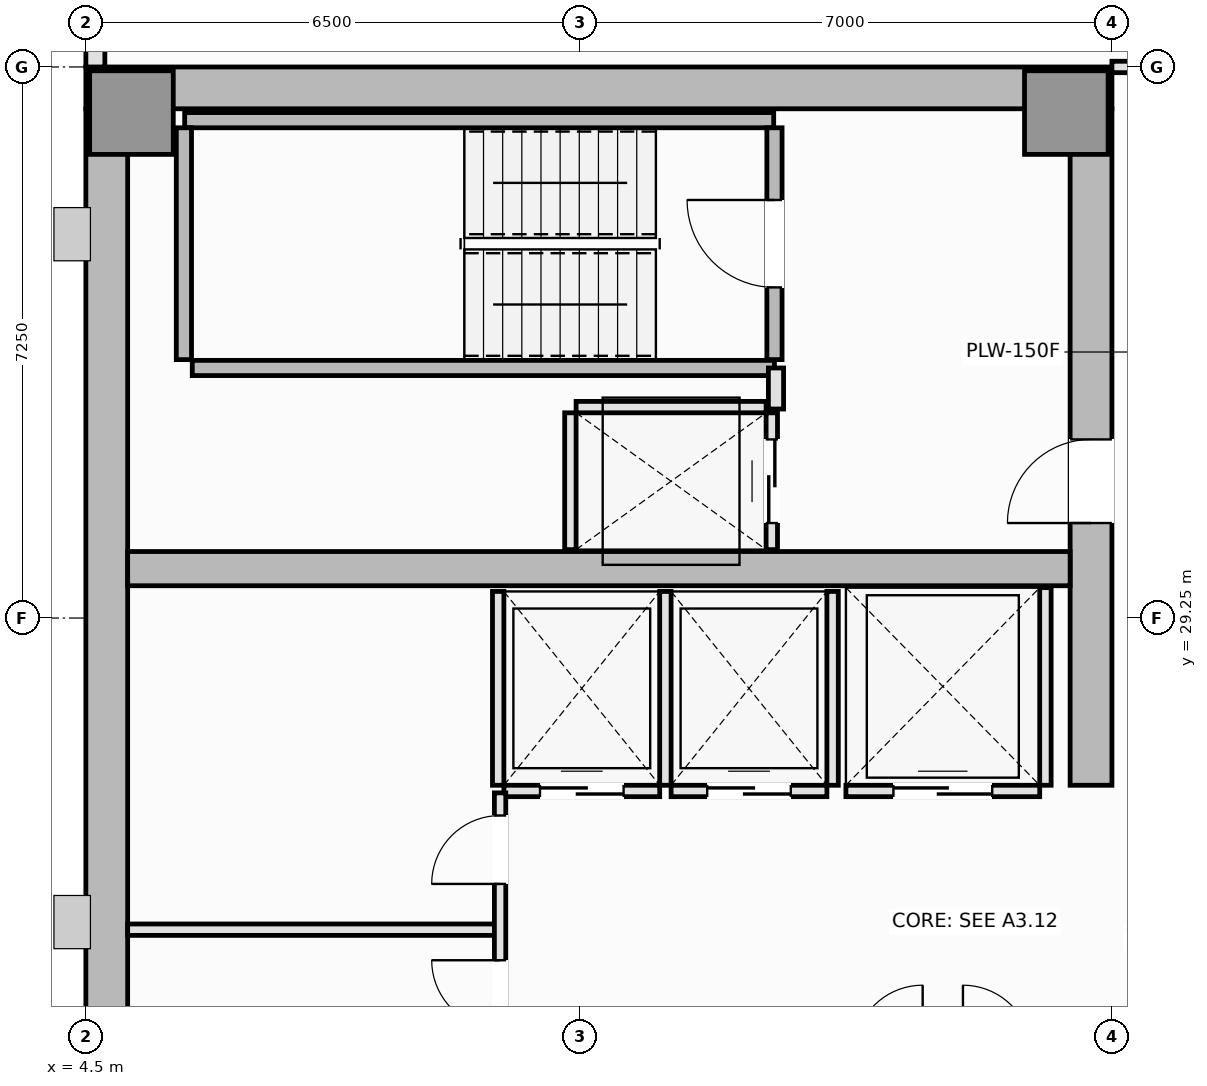
"""IFC4 building model, lengths in metres.
Left out: names, types, materials, properties, quantities, classifications, styles, units other than length and angle.
Written with IfcOpenShell. Run it as: python <this file> out.ifc"""

import sys

from ifc_helpers import new_model, si_unit, direction, frame, frame_2d, origin, origin_2d, place, context, subcontext, project, spatial, rectangle, extrude, element, fill, save


model = new_model("IFC4")
c1 = context("Model", 3, precision=1e-05, world=origin(), true_north=direction((0.0, 1.0)))
c2 = subcontext(c1, "Body", "Model", "MODEL_VIEW")
j1 = project(units=[si_unit("LENGTHUNIT", "METRE"), si_unit("PLANEANGLEUNIT", "RADIAN")], contexts=[c1])
p1 = place(None, origin())
s1 = spatial("IfcSite", under=j1, at=p1, CompositionType="ELEMENT")
p2 = place(p1, origin())
s2 = spatial("IfcBuilding", under=s1, at=p2, CompositionType="ELEMENT")
p3 = place(p2, frame((0.0, 0.0, 223.55)))
s3 = spatial("IfcBuildingStorey", under=s2, at=p3, CompositionType="ELEMENT", Elevation=223.55)
p4 = place(p3, frame((4.5, 36.225, 0.0), z_axis=(0.0, 0.0, 1.0), x_axis=(1.0, 0.0, 0.0)))
e1 = element("IfcWall", 1, at=p4, inside=s3, PredefinedType="SHEAR", context=c2, shape_type="SweptSolid", body=[
    extrude(rectangle(XDim=13.5, YDim=0.55, at=frame_2d((6.75, 0.0))), origin(), (0.0, 0.0, 1.0), 3.55),
])
p5 = place(p3, frame((4.775, 14.55, 0.0), z_axis=(0.0, 0.0, 1.0), x_axis=(0.0, 1.0, 0.0)))
e2 = element("IfcWall", 2, at=p5, inside=s3, PredefinedType="SHEAR", context=c2, shape_type="SweptSolid", body=[
    extrude(rectangle(XDim=21.4, YDim=0.55, at=frame_2d((10.7, 0.0))), origin(), (0.0, 0.0, 1.0), 3.55),
])
p6 = place(p3, frame((17.725, 27.05, 0.0), z_axis=(0.0, 0.0, 1.0), x_axis=(0.0, 1.0, 0.0)))
e3 = element("IfcWall", 3, at=p6, inside=s3, PredefinedType="SHEAR", context=c2, shape_type="SweptSolid", body=[
    extrude(rectangle(XDim=8.9, YDim=0.55, at=frame_2d((4.45, 0.0))), origin(), (0.0, 0.0, 1.0), 3.55),
])
p7 = place(p6, frame((3.45, 0.0, 0.0)))
e4 = element("IfcOpeningElement", 4, at=p7, cuts=e3, PredefinedType="OPENING", context=c2, shape_type="SweptSolid", body=[
    extrude(rectangle(XDim=1.1, YDim=2.15, at=frame_2d((0.55, 1.075))), frame((0.0, 0.285, 0.0), z_axis=(0.0, -1.0, 0.0), x_axis=(1.0, 0.0, 0.0)), (0.0, 0.0, 1.0), 0.57),
])
p8 = place(p3, frame((5.05, 29.9, 0.0), z_axis=(0.0, 0.0, 1.0), x_axis=(1.0, 0.0, 0.0)))
e5 = element("IfcWall", 5, at=p8, inside=s3, PredefinedType="SHEAR", context=c2, shape_type="SweptSolid", body=[
    extrude(rectangle(XDim=12.4, YDim=0.45, at=frame_2d((6.2, 0.0))), origin(), (0.0, 0.0, 1.0), 3.55),
])
for number, where, z_axis, x_axis in (
    (6, (5.1, 35.9, 0.0), (0.0, 0.0, 1.0), (1.0, 0.0, 0.0)),
    (7, (17.4, 35.9, 0.0), (0.0, 0.0, 1.0), (1.0, 0.0, 0.0)),
):
    element("IfcColumn", number, at=place(p3, frame(where, z_axis=z_axis, x_axis=x_axis)), inside=s3, PredefinedType="PILASTER", context=c2, shape_type="SweptSolid", body=[
        extrude(rectangle(XDim=1.1, YDim=1.1, at=origin_2d()), origin(), (0.0, 0.0, 1.0), 3.55),
    ])
p9 = place(p3, frame((4.625, 40.5, 0.0), z_axis=(0.0, 0.0, 1.0), x_axis=(0.0, -1.0, 0.0)))
e8 = element("IfcWall", 8, at=p9, inside=s3, PredefinedType="SOLIDWALL", context=c2, shape_type="SweptSolid", body=[
    extrude(rectangle(XDim=4.0, YDim=0.25, at=frame_2d((2.0, 0.0))), origin(), (0.0, 0.0, 1.0), 3.37),
])
p10 = place(p9, frame((0.9, 0.0, 0.9)))
e9 = element("IfcOpeningElement", 9, at=p10, cuts=e8, PredefinedType="OPENING", context=c2, shape_type="SweptSolid", body=[
    extrude(rectangle(XDim=2.2, YDim=1.8, at=frame_2d((1.1, 0.9))), frame((0.0, 0.135, 0.0), z_axis=(0.0, -1.0, 0.0), x_axis=(1.0, 0.0, 0.0)), (0.0, 0.0, 1.0), 0.27),
])
p11 = place(p3, frame((5.8, 35.8, 0.0), z_axis=(0.0, 0.0, 1.0), x_axis=(1.0, 0.0, 0.0)))
e10 = element("IfcWall", 10, at=p11, inside=s3, PredefinedType="SOLIDWALL", context=c2, shape_type="SweptSolid", body=[
    extrude(rectangle(XDim=7.75, YDim=0.2, at=frame_2d((3.875, 0.0))), origin(), (0.0, 0.0, 1.0), 3.55),
])
p12 = place(p3, frame((5.79, 32.65, 0.0), z_axis=(0.0, 0.0, 1.0), x_axis=(0.0, 1.0, 0.0)))
e11 = element("IfcWall", 11, at=p12, inside=s3, PredefinedType="SOLIDWALL", context=c2, shape_type="SweptSolid", body=[
    extrude(rectangle(XDim=3.05, YDim=0.2, at=frame_2d((1.525, 0.0))), origin(), (0.0, 0.0, 1.0), 3.55),
])
p13 = place(p3, frame((5.9, 32.54, 0.0), z_axis=(0.0, 0.0, 1.0), x_axis=(1.0, 0.0, 0.0)))
e12 = element("IfcWall", 12, at=p13, inside=s3, PredefinedType="SOLIDWALL", context=c2, shape_type="SweptSolid", body=[
    extrude(rectangle(XDim=7.66, YDim=0.2, at=frame_2d((3.83, 0.0))), origin(), (0.0, 0.0, 1.0), 3.55),
])
p14 = place(p3, frame((13.56, 32.65, 0.0), z_axis=(0.0, 0.0, 1.0), x_axis=(0.0, 1.0, 0.0)))
e13 = element("IfcWall", 13, at=p14, inside=s3, PredefinedType="SOLIDWALL", context=c2, shape_type="SweptSolid", body=[
    extrude(rectangle(XDim=3.05, YDim=0.2, at=frame_2d((1.525, 0.0))), origin(), (0.0, 0.0, 1.0), 3.55),
])
p15 = place(p14, frame((0.95, 0.0, 0.0)))
e14 = element("IfcOpeningElement", 14, at=p15, cuts=e13, PredefinedType="OPENING", context=c2, shape_type="SweptSolid", body=[
    extrude(rectangle(XDim=1.15, YDim=2.15, at=frame_2d((0.575, 1.075))), frame((0.0, 0.11, 0.0), z_axis=(0.0, -1.0, 0.0), x_axis=(1.0, 0.0, 0.0)), (0.0, 0.0, 1.0), 0.22),
])
p16 = place(p3, frame((10.0, 26.975, 0.0), z_axis=(0.0, 0.0, 1.0), x_axis=(1.0, 0.0, 0.0)))
e15 = element("IfcWall", 15, at=p16, inside=s3, PredefinedType="PARTITIONING", context=c2, shape_type="SweptSolid", body=[
    extrude(rectangle(XDim=2.05, YDim=0.15, at=frame_2d((1.025, 0.0))), origin(), (0.0, 0.0, 1.0), 3.37),
])
p17 = place(p16, frame((0.475, 0.0, 0.0)))
e16 = element("IfcOpeningElement", 16, at=p17, cuts=e15, PredefinedType="OPENING", context=c2, shape_type="SweptSolid", body=[
    extrude(rectangle(XDim=1.1, YDim=2.2, at=frame_2d((0.55, 1.1))), frame((0.0, 0.085, 0.0), z_axis=(0.0, -1.0, 0.0), x_axis=(1.0, 0.0, 0.0)), (0.0, 0.0, 1.0), 0.17),
])
for number, where, z_axis, x_axis in (
    (17, (9.925, 27.05, 0.0), (0.0, 0.0, 1.0), (0.0, 1.0, 0.0)),
    (18, (12.125, 27.05, 0.0), (0.0, 0.0, 1.0), (0.0, 1.0, 0.0)),
):
    element("IfcWall", number, at=place(p3, frame(where, z_axis=z_axis, x_axis=x_axis)), inside=s3, PredefinedType="PARTITIONING", context=c2, shape_type="SweptSolid", body=[
        extrude(rectangle(XDim=2.55, YDim=0.15, at=frame_2d((1.275, 0.0))), origin(), (0.0, 0.0, 1.0), 3.37),
    ])
p18 = place(p3, frame((12.2, 26.975, 0.0), z_axis=(0.0, 0.0, 1.0), x_axis=(1.0, 0.0, 0.0)))
e19 = element("IfcWall", 19, at=p18, inside=s3, PredefinedType="PARTITIONING", context=c2, shape_type="SweptSolid", body=[
    extrude(rectangle(XDim=2.05, YDim=0.15, at=frame_2d((1.025, 0.0))), origin(), (0.0, 0.0, 1.0), 3.37),
])
p19 = place(p18, frame((0.475, 0.0, 0.0)))
e20 = element("IfcOpeningElement", 20, at=p19, cuts=e19, PredefinedType="OPENING", context=c2, shape_type="SweptSolid", body=[
    extrude(rectangle(XDim=1.1, YDim=2.2, at=frame_2d((0.55, 1.1))), frame((0.0, 0.085, 0.0), z_axis=(0.0, -1.0, 0.0), x_axis=(1.0, 0.0, 0.0)), (0.0, 0.0, 1.0), 0.17),
])
p20 = place(p3, frame((14.325, 27.05, 0.0), z_axis=(0.0, 0.0, 1.0), x_axis=(0.0, 1.0, 0.0)))
e21 = element("IfcWall", 21, at=p20, inside=s3, PredefinedType="PARTITIONING", context=c2, shape_type="SweptSolid", body=[
    extrude(rectangle(XDim=2.55, YDim=0.15, at=frame_2d((1.275, 0.0))), origin(), (0.0, 0.0, 1.0), 3.37),
])
p21 = place(p3, frame((14.5, 26.975, 0.0), z_axis=(0.0, 0.0, 1.0), x_axis=(1.0, 0.0, 0.0)))
e22 = element("IfcWall", 22, at=p21, inside=s3, PredefinedType="PARTITIONING", context=c2, shape_type="SweptSolid", body=[
    extrude(rectangle(XDim=2.55, YDim=0.15, at=frame_2d((1.275, 0.0))), origin(), (0.0, 0.0, 1.0), 3.37),
])
p22 = place(p21, frame((0.625, 0.0, 0.0)))
e23 = element("IfcOpeningElement", 23, at=p22, cuts=e22, PredefinedType="OPENING", context=c2, shape_type="SweptSolid", body=[
    extrude(rectangle(XDim=1.3, YDim=2.2, at=frame_2d((0.65, 1.1))), frame((0.0, 0.085, 0.0), z_axis=(0.0, -1.0, 0.0), x_axis=(1.0, 0.0, 0.0)), (0.0, 0.0, 1.0), 0.17),
])
p23 = place(p3, frame((17.125, 27.05, 0.0), z_axis=(0.0, 0.0, 1.0), x_axis=(0.0, 1.0, 0.0)))
e24 = element("IfcWall", 24, at=p23, inside=s3, PredefinedType="PARTITIONING", context=c2, shape_type="SweptSolid", body=[
    extrude(rectangle(XDim=2.6, YDim=0.15, at=frame_2d((1.3, 0.0))), origin(), (0.0, 0.0, 1.0), 3.37),
])
p24 = place(p3, frame((10.95, 32.025, 0.0), z_axis=(0.0, 0.0, 1.0), x_axis=(1.0, 0.0, 0.0)))
e25 = element("IfcWall", 25, at=p24, inside=s3, PredefinedType="PARTITIONING", context=c2, shape_type="SweptSolid", body=[
    extrude(rectangle(XDim=2.5, YDim=0.15, at=frame_2d((1.25, 0.0))), origin(), (0.0, 0.0, 1.0), 3.37),
])
p25 = place(p3, frame((10.875, 30.15, 0.0), z_axis=(0.0, 0.0, 1.0), x_axis=(0.0, 1.0, 0.0)))
e26 = element("IfcWall", 26, at=p25, inside=s3, PredefinedType="PARTITIONING", context=c2, shape_type="SweptSolid", body=[
    extrude(rectangle(XDim=1.8, YDim=0.15, at=frame_2d((0.9, 0.0))), origin(), (0.0, 0.0, 1.0), 3.37),
])
p26 = place(p3, frame((13.525, 30.15, 0.0), z_axis=(0.0, 0.0, 1.0), x_axis=(0.0, 1.0, 0.0)))
e27 = element("IfcWall", 27, at=p26, inside=s3, PredefinedType="PARTITIONING", context=c2, shape_type="SweptSolid", body=[
    extrude(rectangle(XDim=1.8, YDim=0.15, at=frame_2d((0.9, 0.0))), origin(), (0.0, 0.0, 1.0), 3.37),
])
p27 = place(p26, frame((0.35, 0.0, 0.0)))
e28 = element("IfcOpeningElement", 28, at=p27, cuts=e27, PredefinedType="OPENING", context=c2, shape_type="SweptSolid", body=[
    extrude(rectangle(XDim=1.1, YDim=2.2, at=frame_2d((0.55, 1.1))), frame((0.0, 0.085, 0.0), z_axis=(0.0, -1.0, 0.0), x_axis=(1.0, 0.0, 0.0)), (0.0, 0.0, 1.0), 0.17),
])
p28 = place(p3, frame((13.58, 32.0, 0.0), z_axis=(0.0, 0.0, 1.0), x_axis=(0.0, 1.0, 0.0)))
e29 = element("IfcWall", 29, at=p28, inside=s3, PredefinedType="PARTITIONING", context=c2, shape_type="SweptSolid", body=[
    extrude(rectangle(XDim=0.54, YDim=0.2, at=frame_2d((0.27, 0.0))), origin(), (0.0, 0.0, 1.0), 3.37),
])
p29 = place(p3, frame((5.05, 25.15, 0.0), z_axis=(0.0, 0.0, 1.0), x_axis=(1.0, 0.0, 0.0)))
e30 = element("IfcWall", 30, at=p29, inside=s3, PredefinedType="PARTITIONING", context=c2, shape_type="SweptSolid", body=[
    extrude(rectangle(XDim=4.9, YDim=0.15, at=frame_2d((2.45, 0.0))), origin(), (0.0, 0.0, 1.0), 3.37),
])
p30 = place(p3, frame((9.95, 23.55, 0.0), z_axis=(0.0, 0.0, 1.0), x_axis=(0.0, 1.0, 0.0)))
e31 = element("IfcWall", 31, at=p30, inside=s3, PredefinedType="PARTITIONING", context=c2, shape_type="SweptSolid", body=[
    extrude(rectangle(XDim=3.4, YDim=0.15, at=frame_2d((1.7, 0.0))), origin(), (0.0, 0.0, 1.0), 3.37),
])
p31 = place(p30, frame((0.298, 0.0, 0.0)))
e32 = element("IfcOpeningElement", 32, at=p31, cuts=e31, PredefinedType="OPENING", context=c2, shape_type="SweptSolid", body=[
    extrude(rectangle(XDim=0.9, YDim=2.1, at=frame_2d((0.45, 1.05))), frame((0.0, 0.085, 0.0), z_axis=(0.0, -1.0, 0.0), x_axis=(1.0, 0.0, 0.0)), (0.0, 0.0, 1.0), 0.17),
])
p32 = place(p30, frame((2.202, 0.0, 0.0)))
e33 = element("IfcOpeningElement", 33, at=p32, cuts=e31, PredefinedType="OPENING", context=c2, shape_type="SweptSolid", body=[
    extrude(rectangle(XDim=0.9, YDim=2.1, at=frame_2d((0.45, 1.05))), frame((0.0, 0.085, 0.0), z_axis=(0.0, -1.0, 0.0), x_axis=(1.0, 0.0, 0.0)), (0.0, 0.0, 1.0), 0.17),
])
p33 = place(p3, frame((18.0, 36.5, 0.0), z_axis=(0.0, 0.0, 1.0), x_axis=(1.0, 0.0, 0.0)))
e34 = element("IfcWall", 34, at=p33, inside=s3, PredefinedType="PARTITIONING", context=c2, shape_type="SweptSolid", body=[
    extrude(rectangle(XDim=1.9, YDim=0.15, at=frame_2d((0.95, 0.0))), origin(), (0.0, 0.0, 1.0), 3.37),
])
p34 = place(p33, frame((0.5, 0.0, 0.0)))
e35 = element("IfcOpeningElement", 35, at=p34, cuts=e34, PredefinedType="OPENING", context=c2, shape_type="SweptSolid", body=[
    extrude(rectangle(XDim=0.9, YDim=2.1, at=frame_2d((0.45, 1.05))), frame((0.0, 0.085, 0.0), z_axis=(0.0, -1.0, 0.0), x_axis=(1.0, 0.0, 0.0)), (0.0, 0.0, 1.0), 0.17),
])
p35 = place(p15, origin())
e36 = element("IfcDoor", 36, at=p35, inside=s3, OperationType="SINGLE_SWING_RIGHT", PredefinedType="DOOR", context=c2, shape_type="SweptSolid", body=[
    extrude(rectangle(XDim=1.15, YDim=2.15, at=frame_2d((0.575, 1.075))), frame((0.0, 0.025, 0.0), z_axis=(0.0, -1.0, 0.0), x_axis=(1.0, 0.0, 0.0)), (0.0, 0.0, 1.0), 0.05),
])
fill(e14, e36)
p36 = place(p17, origin())
e37 = element("IfcDoor", 37, at=p36, inside=s3, OperationType="DOUBLE_DOOR_SLIDING", PredefinedType="DOOR", context=c2, shape_type="SweptSolid", body=[
    extrude(rectangle(XDim=1.1, YDim=2.2, at=frame_2d((0.55, 1.1))), frame((0.0, 0.025, 0.0), z_axis=(0.0, -1.0, 0.0), x_axis=(1.0, 0.0, 0.0)), (0.0, 0.0, 1.0), 0.05),
])
fill(e16, e37)
p37 = place(p19, origin())
e38 = element("IfcDoor", 38, at=p37, inside=s3, OperationType="DOUBLE_DOOR_SLIDING", PredefinedType="DOOR", context=c2, shape_type="SweptSolid", body=[
    extrude(rectangle(XDim=1.1, YDim=2.2, at=frame_2d((0.55, 1.1))), frame((0.0, 0.025, 0.0), z_axis=(0.0, -1.0, 0.0), x_axis=(1.0, 0.0, 0.0)), (0.0, 0.0, 1.0), 0.05),
])
fill(e20, e38)
p38 = place(p22, origin())
e39 = element("IfcDoor", 39, at=p38, inside=s3, OperationType="DOUBLE_DOOR_SLIDING", PredefinedType="DOOR", context=c2, shape_type="SweptSolid", body=[
    extrude(rectangle(XDim=1.3, YDim=2.2, at=frame_2d((0.65, 1.1))), frame((0.0, 0.025, 0.0), z_axis=(0.0, -1.0, 0.0), x_axis=(1.0, 0.0, 0.0)), (0.0, 0.0, 1.0), 0.05),
])
fill(e23, e39)
p39 = place(p27, origin())
e40 = element("IfcDoor", 40, at=p39, inside=s3, OperationType="DOUBLE_DOOR_SLIDING", PredefinedType="DOOR", context=c2, shape_type="SweptSolid", body=[
    extrude(rectangle(XDim=1.1, YDim=2.2, at=frame_2d((0.55, 1.1))), frame((0.0, 0.025, 0.0), z_axis=(0.0, -1.0, 0.0), x_axis=(1.0, 0.0, 0.0)), (0.0, 0.0, 1.0), 0.05),
])
fill(e28, e40)
p40 = place(p7, origin())
e41 = element("IfcDoor", 41, at=p40, inside=s3, OperationType="SINGLE_SWING_LEFT", PredefinedType="DOOR", context=c2, shape_type="SweptSolid", body=[
    extrude(rectangle(XDim=1.1, YDim=2.15, at=frame_2d((0.55, 1.075))), frame((0.0, 0.025, 0.0), z_axis=(0.0, -1.0, 0.0), x_axis=(1.0, 0.0, 0.0)), (0.0, 0.0, 1.0), 0.05),
])
fill(e4, e41)
p41 = place(p31, origin())
e42 = element("IfcDoor", 42, at=p41, inside=s3, OperationType="SINGLE_SWING_RIGHT", PredefinedType="DOOR", context=c2, shape_type="SweptSolid", body=[
    extrude(rectangle(XDim=0.9, YDim=2.1, at=frame_2d((0.45, 1.05))), frame((0.0, 0.025, 0.0), z_axis=(0.0, -1.0, 0.0), x_axis=(1.0, 0.0, 0.0)), (0.0, 0.0, 1.0), 0.05),
])
fill(e32, e42)
p42 = place(p32, origin())
e43 = element("IfcDoor", 43, at=p42, inside=s3, OperationType="SINGLE_SWING_LEFT", PredefinedType="DOOR", context=c2, shape_type="SweptSolid", body=[
    extrude(rectangle(XDim=0.9, YDim=2.1, at=frame_2d((0.45, 1.05))), frame((0.0, 0.025, 0.0), z_axis=(0.0, -1.0, 0.0), x_axis=(1.0, 0.0, 0.0)), (0.0, 0.0, 1.0), 0.05),
])
fill(e33, e43)
save(model, sys.argv[1])
